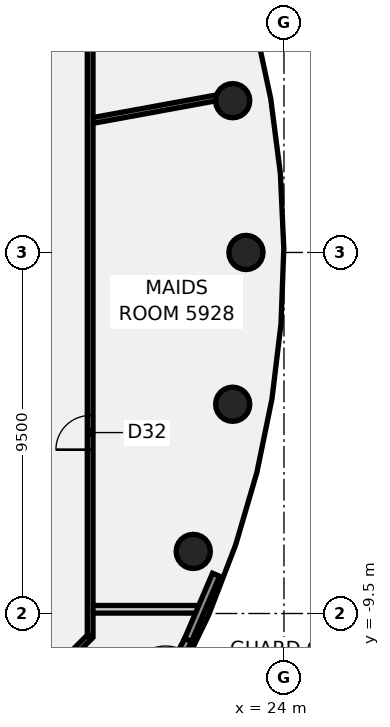
"""IFC4 building model, lengths in metres.
Left out: names, types, materials, properties, quantities, classifications, styles, units other than length and angle.
Written with IfcOpenShell. Run it as: python <this file> out.ifc"""

import sys

from ifc_helpers import new_model, si_unit, direction, frame, frame_2d, origin, origin_2d, place, context, subcontext, project, spatial, rectangle, circle, extrude, element, fill, save


model = new_model("IFC4")
c1 = context("Model", 3, precision=1e-05, world=origin(), true_north=direction((0.0, 1.0)))
c2 = subcontext(c1, "Body", "Model", "MODEL_VIEW")
j1 = project(units=[si_unit("LENGTHUNIT", "METRE"), si_unit("PLANEANGLEUNIT", "RADIAN")], contexts=[c1])
p1 = place(None, origin())
s1 = spatial("IfcSite", under=j1, at=p1, CompositionType="ELEMENT")
p2 = place(p1, origin())
s2 = spatial("IfcBuilding", under=s1, at=p2, CompositionType="ELEMENT")
p3 = place(p2, frame((0.0, 0.0, 234.3)))
s3 = spatial("IfcBuildingStorey", under=s2, at=p3, CompositionType="ELEMENT", Elevation=234.3)
for number, where, z_axis, x_axis in (
    (1, (23.0, 0.0, -0.14), (0.0, 0.0, 1.0), (1.0, 0.0, 0.0)),
    (2, (22.651, 3.994, -0.14), (0.0, 0.0, 1.0), (1.0, 0.0, 0.0)),
    (3, (21.613, -7.866, -0.14), (0.0, 0.0, 1.0), (1.0, 0.0, 0.0)),
    (4, (22.651, -3.994, -0.14), (0.0, 0.0, 1.0), (1.0, 0.0, 0.0)),
):
    element("IfcColumn", number, at=place(p3, frame(where, z_axis=z_axis, x_axis=x_axis)), inside=s3, PredefinedType="COLUMN", context=c2, shape_type="SweptSolid", body=[
        extrude(circle(Radius=0.45, at=origin_2d()), origin(), (0.0, 0.0, 1.0), 3.6),
    ])
p4 = place(p3, frame((18.955, -9.389, 0.0), z_axis=(0.0, 0.0, 1.0), x_axis=(1.0, 0.0, 0.0)))
e5 = element("IfcWall", 5, at=p4, inside=s3, PredefinedType="PARTITIONING", context=c2, shape_type="SweptSolid", body=[
    extrude(rectangle(XDim=2.798, YDim=0.2, at=frame_2d((1.399, 0.0))), origin(), (0.0, 0.0, 1.0), 2.864),
])
p5 = place(p3, frame((18.969, 3.473, 0.0), z_axis=(0.0, 0.0, 1.0), x_axis=(0.983666527539, 0.180000451664, 0.0)))
e6 = element("IfcWall", 6, at=p5, inside=s3, PredefinedType="PARTITIONING", context=c2, shape_type="SweptSolid", body=[
    extrude(rectangle(XDim=3.294, YDim=0.15, at=frame_2d((1.647, 0.0))), origin(), (0.0, 0.0, 1.0), 2.864),
])
p6 = place(p3, frame((17.1, -11.9, 0.0), z_axis=(0.0, 0.0, 1.0), x_axis=(0.707106781187, 0.707106781187, 0.0)))
e7 = element("IfcWall", 7, at=p6, inside=s3, PredefinedType="PARTITIONING", context=c2, shape_type="SweptSolid", body=[
    extrude(rectangle(XDim=2.505, YDim=0.15, at=frame_2d((1.253, 0.0))), origin(), (0.0, 0.0, 1.0), 2.864),
])
p7 = place(p3, frame((18.9, -10.1, 0.0), z_axis=(0.0, 0.0, 1.0), x_axis=(0.0, 1.0, 0.0)))
e8 = element("IfcWall", 8, at=p7, inside=s3, PredefinedType="PARTITIONING", context=c2, shape_type="SweptSolid", body=[
    extrude(rectangle(XDim=20.2, YDim=0.15, at=frame_2d((10.1, 0.0))), origin(), (0.0, 0.0, 1.0), 2.864),
])
p8 = place(p7, frame((4.911, 0.0, 0.0)))
e9 = element("IfcOpeningElement", 9, at=p8, cuts=e8, PredefinedType="OPENING", context=c2, shape_type="SweptSolid", body=[
    extrude(rectangle(XDim=0.9, YDim=2.1, at=frame_2d((0.45, 1.05))), frame((0.0, 0.085, 0.0), z_axis=(0.0, -1.0, 0.0), x_axis=(1.0, 0.0, 0.0)), (0.0, 0.0, 1.0), 0.17),
])
p9 = place(p3, frame((21.477, -10.199, 0.0), z_axis=(0.0, 0.0, 1.0), x_axis=(0.392831837578, 0.919610323662, 0.0)))
e10 = element("IfcWall", 10, at=p9, inside=s3, PredefinedType="SOLIDWALL", context=c2, shape_type="SweptSolid", body=[
    extrude(rectangle(XDim=1.87, YDim=0.2, at=frame_2d((0.935, 0.0))), origin(), (0.0, 0.0, 1.0), 3.46),
])
p10 = place(p3, frame((20.748, -11.622, 0.0), z_axis=(0.0, 0.0, 1.0), x_axis=(0.456108930907, 0.889923953575, 0.0)))
e11 = element("IfcWall", 11, at=p10, inside=s3, PredefinedType="SOLIDWALL", context=c2, shape_type="SweptSolid", body=[
    extrude(rectangle(XDim=1.599, YDim=0.2, at=frame_2d((0.799, 0.0))), origin(), (0.0, 0.0, 1.0), 3.46),
])
p11 = place(p10, frame((0.3, 0.0, 0.0)))
e12 = element("IfcOpeningElement", 12, at=p11, cuts=e11, PredefinedType="OPENING", context=c2, shape_type="SweptSolid", body=[
    extrude(rectangle(XDim=1.0, YDim=2.4, at=frame_2d((0.5, 1.2))), frame((0.0, 0.11, 0.0), z_axis=(0.0, -1.0, 0.0), x_axis=(1.0, 0.0, 0.0)), (0.0, 0.0, 1.0), 0.22),
])
p12 = place(p8, frame((0.9, 0.0, 0.0), z_axis=(0.0, 0.0, 1.0), x_axis=(-1.0, 0.0, 0.0)))
e13 = element("IfcDoor", 13, at=p12, inside=s3, OperationType="SINGLE_SWING_LEFT", PredefinedType="DOOR", context=c2, shape_type="SweptSolid", body=[
    extrude(rectangle(XDim=0.9, YDim=2.1, at=frame_2d((0.45, 1.05))), frame((0.0, 0.025, 0.0), z_axis=(0.0, -1.0, 0.0), x_axis=(1.0, 0.0, 0.0)), (0.0, 0.0, 1.0), 0.05),
])
fill(e9, e13)
save(model, sys.argv[1])
